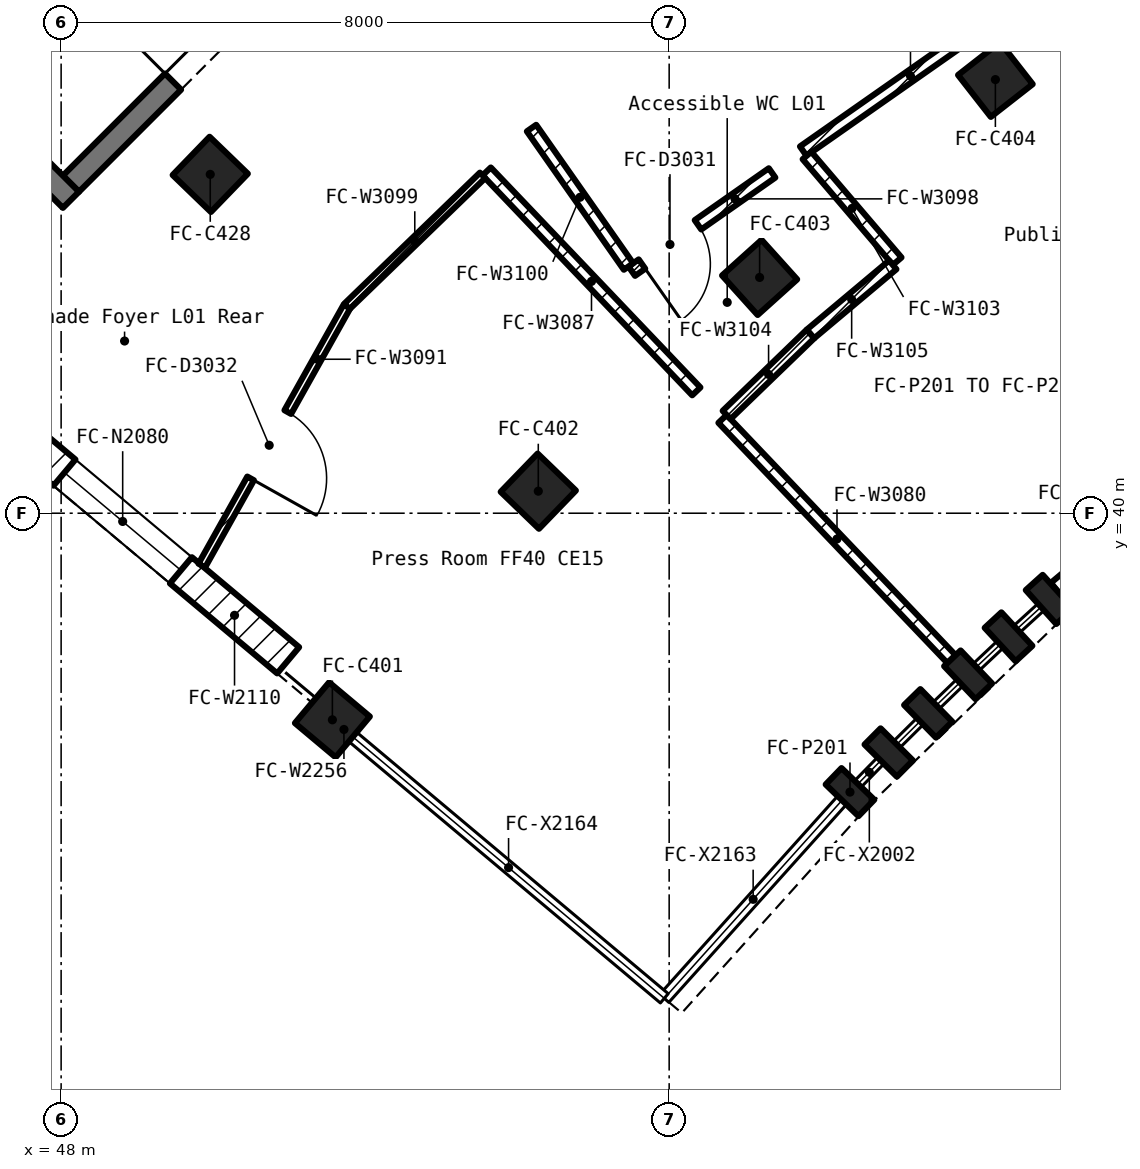
"""IFC4 building model, lengths in metres.
Left out: names, types, materials, properties, quantities, classifications, styles, units other than length and angle.
Written with IfcOpenShell. Run it as: python <this file> out.ifc"""

import sys

from ifc_helpers import new_model, si_unit, direction, frame, frame_2d, origin, origin_2d, place, context, subcontext, project, spatial, rectangle, extrude, element, fill, save


model = new_model("IFC4")
c1 = context("Model", 3, precision=1e-05, world=origin(), true_north=direction((0.0, 1.0)))
c2 = subcontext(c1, "Body", "Model", "MODEL_VIEW")
j1 = project(units=[si_unit("LENGTHUNIT", "METRE"), si_unit("PLANEANGLEUNIT", "RADIAN")], contexts=[c1])
p1 = place(None, origin())
s1 = spatial("IfcSite", under=j1, at=p1, CompositionType="ELEMENT")
p2 = place(p1, origin())
s2 = spatial("IfcBuilding", under=s1, at=p2, CompositionType="ELEMENT")
p3 = place(p2, frame((0.0, 0.0, 6.0)))
s3 = spatial("IfcBuildingStorey", under=s2, at=p3, CompositionType="ELEMENT", Elevation=6.0)
for number, where, z_axis, x_axis in (
    (1, (58.379, 36.331, 0.0), (0.0, 0.0, 1.0), (0.695, 0.719, 0.0)),
    (2, (58.889, 36.852, 0.0), (0.0, 0.0, 1.0), (0.705, 0.71, 0.0)),
    (3, (59.408, 37.367, 0.0), (0.0, 0.0, 1.0), (0.714, 0.7, 0.0)),
    (4, (59.933, 37.874, 0.0), (0.0, 0.0, 1.0), (0.724, 0.69, 0.0)),
    (5, (60.465, 38.374, 0.0), (0.0, 0.0, 1.0), (0.734, 0.679, 0.0)),
    (6, (61.004, 38.866, 0.0), (0.0, 0.0, 1.0), (0.743, 0.669, 0.0)),
):
    element("IfcColumn", number, at=place(p3, frame(where, z_axis=z_axis, x_axis=x_axis)), inside=s3, PredefinedType="COLUMN", context=c2, shape_type="SweptSolid", body=[
        extrude(rectangle(XDim=0.3, YDim=0.6, at=origin_2d()), origin(), (0.0, 0.0, 1.0), 4.3),
    ])
for number, where, z_axis, x_axis in (
    (7, (51.569, 37.282, 0.0), (0.0, 0.0, 1.0), (0.643, 0.766, 0.0)),
    (8, (54.278, 40.29, 0.0), (0.0, 0.0, 1.0), (0.695, 0.719, 0.0)),
    (9, (57.19, 43.102, 0.0), (0.0, 0.0, 1.0), (0.743, 0.669, 0.0)),
    (10, (60.292, 45.705, 0.0), (0.0, 0.0, 1.0), (0.788, 0.616, 0.0)),
    (11, (49.962, 44.458, 0.0), (0.0, 0.0, 1.0), (0.695, 0.719, 0.0)),
):
    element("IfcColumn", number, at=place(p3, frame(where, z_axis=z_axis, x_axis=x_axis)), inside=s3, PredefinedType="COLUMN", context=c2, shape_type="SweptSolid", body=[
        extrude(rectangle(XDim=0.7, YDim=0.7, at=origin_2d()), origin(), (0.0, 0.0, 1.0), 5.5),
    ])
p4 = place(p3, frame((61.166, 38.911, 0.0), z_axis=(0.0, 0.0, 1.0), x_axis=(0.766111561279, 0.642707612896, 0.0)))
e12 = element("IfcWall", 12, at=p4, inside=s3, PredefinedType="SOLIDWALL", context=c2, shape_type="SweptSolid", body=[
    extrude(rectangle(XDim=3.345, YDim=0.45, at=frame_2d((1.673, 0.0))), origin(), (0.0, 0.0, 1.0), 4.3),
])
p5 = place(p4, frame((0.773, 0.0, 1.0)))
e13 = element("IfcOpeningElement", 13, at=p5, cuts=e12, PredefinedType="OPENING", context=c2, shape_type="SweptSolid", body=[
    extrude(rectangle(XDim=1.8, YDim=2.0, at=frame_2d((0.9, 1.0))), frame((0.0, 0.237, 0.0), z_axis=(0.0, -1.0, 0.0), x_axis=(1.0, 0.0, 0.0)), (0.0, 0.0, 1.0), 0.474),
])
p6 = place(p3, frame((50.987, 38.065, 0.0), z_axis=(0.0, 0.0, 1.0), x_axis=(-0.766076229388, 0.642749726384, 0.0)))
e14 = element("IfcWall", 14, at=p6, inside=s3, PredefinedType="SOLIDWALL", context=c2, shape_type="SweptSolid", body=[
    extrude(rectangle(XDim=5.684, YDim=0.45, at=frame_2d((2.842, 0.0))), origin(), (0.0, 0.0, 1.0), 4.48),
])
p7 = place(p6, frame((1.842, 0.0, 1.0)))
e15 = element("IfcOpeningElement", 15, at=p7, cuts=e14, PredefinedType="OPENING", context=c2, shape_type="SweptSolid", body=[
    extrude(rectangle(XDim=2.0, YDim=2.8, at=frame_2d((1.0, 1.4))), frame((0.0, 0.237, 0.0), z_axis=(0.0, -1.0, 0.0), x_axis=(1.0, 0.0, 0.0)), (0.0, 0.0, 1.0), 0.474),
])
p8 = place(p3, frame((48.129, 44.335, 0.0), z_axis=(0.0, 0.0, 1.0), x_axis=(0.707106781187, 0.707106781187, 0.0)))
e16 = element("IfcWall", 16, at=p8, inside=s3, PredefinedType="SOLIDWALL", context=c2, shape_type="SweptSolid", body=[
    extrude(rectangle(XDim=5.001, YDim=0.3, at=frame_2d((2.5, 0.0))), origin(), (0.0, 0.0, 1.0), 5.5),
])
p9 = place(p8, frame((1.9, 0.0, 0.0)))
e17 = element("IfcOpeningElement", 17, at=p9, cuts=e16, PredefinedType="OPENING", context=c2, shape_type="SweptSolid", body=[
    extrude(rectangle(XDim=1.2, YDim=2.1, at=frame_2d((0.6, 1.05))), frame((0.0, 0.162, 0.0), z_axis=(0.0, -1.0, 0.0), x_axis=(1.0, 0.0, 0.0)), (0.0, 0.0, 1.0), 0.324),
])
p10 = place(p3, frame((41.058, 51.194, 0.0), z_axis=(0.0, 0.0, 1.0), x_axis=(0.7070945738, -0.707118988363, 0.0)))
e18 = element("IfcWall", 18, at=p10, inside=s3, PredefinedType="SOLIDWALL", context=c2, shape_type="SweptSolid", body=[
    extrude(rectangle(XDim=10.0, YDim=0.3, at=frame_2d((5.0, 0.0))), origin(), (0.0, 0.0, 1.0), 5.5),
])
p11 = place(p3, frame((59.714, 38.081, 0.0), z_axis=(0.0, 0.0, 1.0), x_axis=(-0.689987450542, 0.723821330229, 0.0)))
e19 = element("IfcWall", 19, at=p11, inside=s3, PredefinedType="PARTITIONING", context=c2, shape_type="SweptSolid", body=[
    extrude(rectangle(XDim=4.365, YDim=0.15, at=frame_2d((2.183, 0.0))), origin(), (0.0, 0.0, 1.0), 4.3),
])
p12 = place(p3, frame((56.357, 41.603, 0.0), z_axis=(0.0, 0.0, 1.0), x_axis=(-0.68986253999, 0.723940381467, 0.0)))
e20 = element("IfcWall", 20, at=p12, inside=s3, PredefinedType="PARTITIONING", context=c2, shape_type="SweptSolid", body=[
    extrude(rectangle(XDim=3.998, YDim=0.15, at=frame_2d((1.999, 0.0))), origin(), (0.0, 0.0, 1.0), 4.38),
])
p13 = place(p3, frame((51.761, 42.721, 0.0), z_axis=(0.0, 0.0, 1.0), x_axis=(-0.488780296496, -0.872406912946, 0.0)))
e21 = element("IfcWall", 21, at=p13, inside=s3, PredefinedType="PARTITIONING", context=c2, shape_type="SweptSolid", body=[
    extrude(rectangle(XDim=3.907, YDim=0.1, at=frame_2d((1.954, 0.0))), origin(), (0.0, 0.0, 1.0), 4.38),
])
p14 = place(p13, frame((1.594, 0.0, 0.0)))
e22 = element("IfcOpeningElement", 22, at=p14, cuts=e21, PredefinedType="OPENING", context=c2, shape_type="SweptSolid", body=[
    extrude(rectangle(XDim=1.0, YDim=2.1, at=frame_2d((0.5, 1.05))), frame((0.0, 0.062, 0.0), z_axis=(0.0, -1.0, 0.0), x_axis=(1.0, 0.0, 0.0)), (0.0, 0.0, 1.0), 0.124),
])
p15 = place(p3, frame((60.586, 46.74, 0.0), z_axis=(0.0, 0.0, 1.0), x_axis=(-0.819142019814, -0.573590752519, 0.0)))
e23 = element("IfcWall", 23, at=p15, inside=s3, PredefinedType="PARTITIONING", context=c2, shape_type="SweptSolid", body=[
    extrude(rectangle(XDim=3.445, YDim=0.15, at=frame_2d((1.723, 0.0))), origin(), (0.0, 0.0, 1.0), 4.38),
])
p16 = place(p3, frame((57.354, 44.477, 0.0), z_axis=(0.0, 0.0, 1.0), x_axis=(-0.81906394147, -0.573702239654, 0.0)))
e24 = element("IfcWall", 24, at=p16, inside=s3, PredefinedType="PARTITIONING", context=c2, shape_type="SweptSolid", body=[
    extrude(rectangle(XDim=2.254, YDim=0.15, at=frame_2d((1.127, 0.0))), origin(), (0.0, 0.0, 1.0), 4.38),
])
p17 = place(p16, frame((1.19, 0.0, 0.0)))
e25 = element("IfcOpeningElement", 25, at=p17, cuts=e24, PredefinedType="OPENING", context=c2, shape_type="SweptSolid", body=[
    extrude(rectangle(XDim=0.9, YDim=2.1, at=frame_2d((0.45, 1.05))), frame((0.0, 0.087, 0.0), z_axis=(0.0, -1.0, 0.0), x_axis=(1.0, 0.0, 0.0)), (0.0, 0.0, 1.0), 0.174),
])
p18 = place(p3, frame((53.545, 44.445, 0.0), z_axis=(0.0, 0.0, 1.0), x_axis=(-0.719058856753, -0.694949178376, 0.0)))
e26 = element("IfcWall", 26, at=p18, inside=s3, PredefinedType="PARTITIONING", context=c2, shape_type="SweptSolid", body=[
    extrude(rectangle(XDim=2.481, YDim=0.1, at=frame_2d((1.24, 0.0))), origin(), (0.0, 0.0, 1.0), 4.38),
])
p19 = place(p3, frame((55.465, 43.246, 0.0), z_axis=(0.0, 0.0, 1.0), x_axis=(-0.57393388112, 0.818901642508, 0.0)))
e27 = element("IfcWall", 27, at=p19, inside=s3, PredefinedType="PARTITIONING", context=c2, shape_type="SweptSolid", body=[
    extrude(rectangle(XDim=2.223, YDim=0.15, at=frame_2d((1.112, 0.0))), origin(), (0.0, 0.0, 1.0), 4.38),
])
p20 = place(p3, frame((59.0, 43.316, 0.0), z_axis=(0.0, 0.0, 1.0), x_axis=(-0.649360360175, 0.760480849617, 0.0)))
e28 = element("IfcWall", 28, at=p20, inside=s3, PredefinedType="PARTITIONING", context=c2, shape_type="SweptSolid", body=[
    extrude(rectangle(XDim=1.828, YDim=0.15, at=frame_2d((0.914, 0.0))), origin(), (0.0, 0.0, 1.0), 4.38),
])
p21 = place(p3, frame((56.756, 41.293, 0.0), z_axis=(0.0, 0.0, 1.0), x_axis=(0.719406943096, 0.694588835373, 0.0)))
e29 = element("IfcWall", 29, at=p21, inside=s3, PredefinedType="PARTITIONING", context=c2, shape_type="SweptSolid", body=[
    extrude(rectangle(XDim=1.535, YDim=0.15, at=frame_2d((0.767, 0.0))), origin(), (0.0, 0.0, 1.0), 4.38),
])
p22 = place(p3, frame((57.86, 42.359, 0.0), z_axis=(0.0, 0.0, 1.0), x_axis=(0.76587849312, 0.642985329363, 0.0)))
e30 = element("IfcWall", 30, at=p22, inside=s3, PredefinedType="PARTITIONING", context=c2, shape_type="SweptSolid", body=[
    extrude(rectangle(XDim=1.413, YDim=0.15, at=frame_2d((0.706, 0.0))), origin(), (0.0, 0.0, 1.0), 4.38),
])
p23 = place(p3, frame((51.838, 37.057, 0.0), z_axis=(0.0, 0.0, 1.0), x_axis=(-0.766382097523, 0.642384994062, 0.0)))
e31 = element("IfcWall", 31, at=p23, inside=s3, PredefinedType="SOLIDWALL", context=c2, shape_type="SweptSolid", body=[
    extrude(rectangle(XDim=0.305, YDim=0.18, at=frame_2d((0.153, 0.0))), origin(), (0.0, 0.0, 1.0), 4.65),
])
p24 = place(p7, origin())
e32 = element("IfcWindow", 32, at=p24, inside=s3, PartitioningType="DOUBLE_PANEL_VERTICAL", PredefinedType="WINDOW", context=c2, shape_type="SweptSolid", body=[
    extrude(rectangle(XDim=2.0, YDim=2.8, at=frame_2d((1.0, 1.4))), frame((0.0, 0.03, 0.0), z_axis=(0.0, -1.0, 0.0), x_axis=(1.0, 0.0, 0.0)), (0.0, 0.0, 1.0), 0.06),
])
fill(e15, e32)
p25 = place(p9, origin())
e33 = element("IfcDoor", 33, at=p25, inside=s3, OperationType="SINGLE_SWING_LEFT", PredefinedType="DOOR", context=c2, shape_type="SweptSolid", body=[
    extrude(rectangle(XDim=1.2, YDim=2.1, at=frame_2d((0.6, 1.05))), frame((0.0, 0.025, 0.0), z_axis=(0.0, -1.0, 0.0), x_axis=(1.0, 0.0, 0.0)), (0.0, 0.0, 1.0), 0.05),
])
fill(e17, e33)
p26 = place(p17, origin())
e34 = element("IfcDoor", 34, at=p26, inside=s3, OperationType="SINGLE_SWING_RIGHT", PredefinedType="DOOR", context=c2, shape_type="SweptSolid", body=[
    extrude(rectangle(XDim=0.9, YDim=2.1, at=frame_2d((0.45, 1.05))), frame((0.0, 0.025, 0.0), z_axis=(0.0, -1.0, 0.0), x_axis=(1.0, 0.0, 0.0)), (0.0, 0.0, 1.0), 0.05),
])
fill(e25, e34)
p27 = place(p14, origin())
e35 = element("IfcDoor", 35, at=p27, inside=s3, OperationType="SINGLE_SWING_RIGHT", PredefinedType="DOOR", context=c2, shape_type="SweptSolid", body=[
    extrude(rectangle(XDim=1.0, YDim=2.1, at=frame_2d((0.5, 1.05))), frame((0.0, 0.025, 0.0), z_axis=(0.0, -1.0, 0.0), x_axis=(1.0, 0.0, 0.0)), (0.0, 0.0, 1.0), 0.05),
])
fill(e22, e35)
save(model, sys.argv[1])
